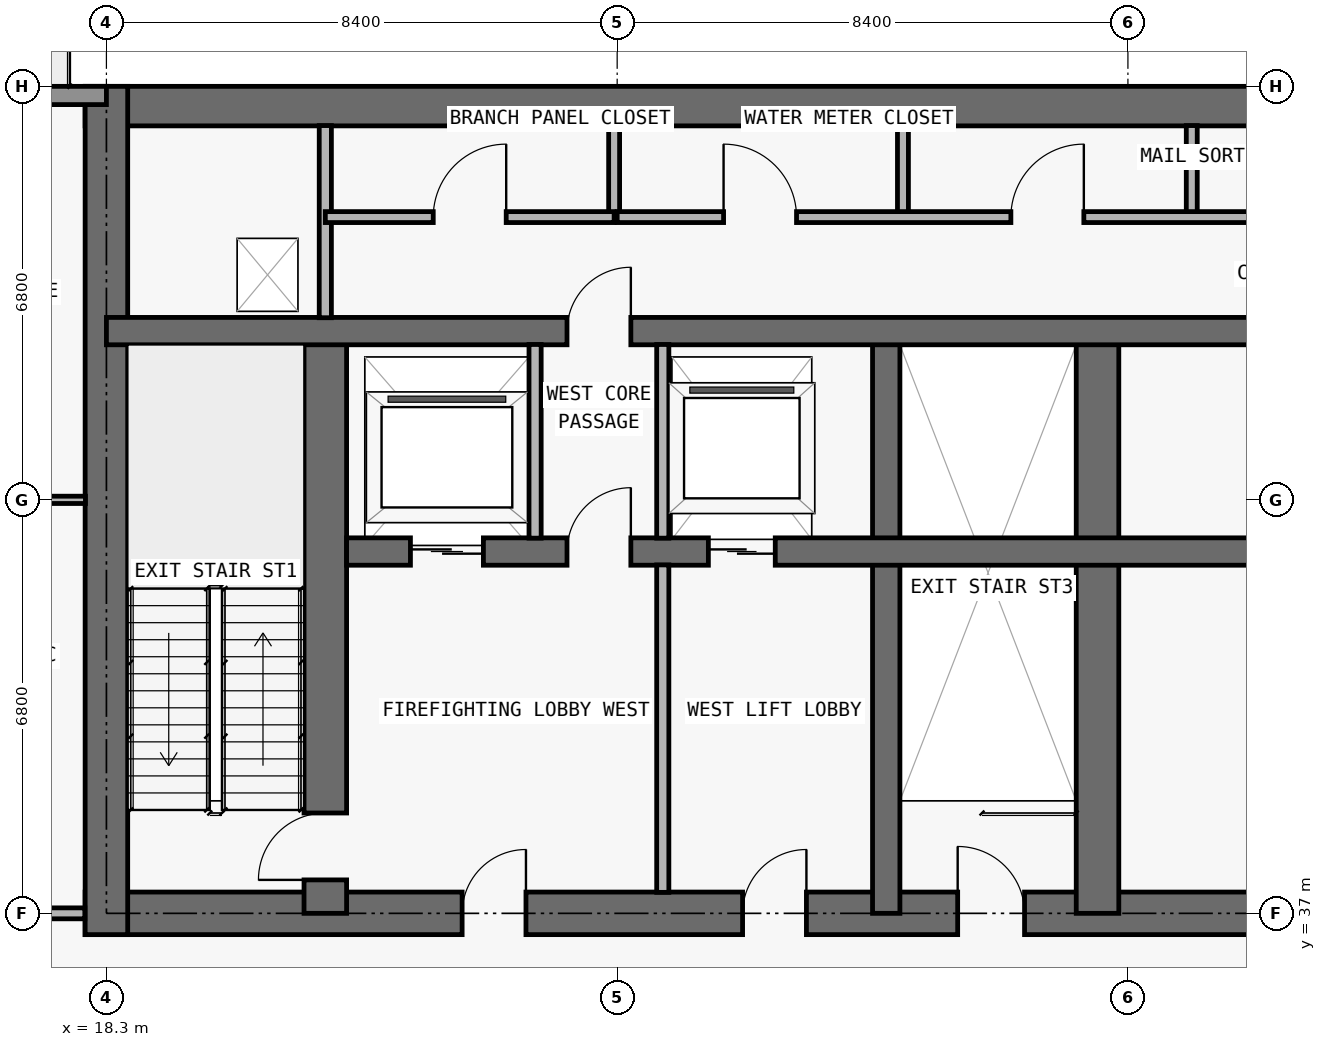
"""IFC4 building model, lengths in metres.
Left out: names, types, materials, properties, quantities, classifications, styles, units other than length and angle.
Written with IfcOpenShell. Run it as: python <this file> out.ifc"""

import sys

from ifc_helpers import new_model, si_unit, direction, frame, frame_2d, origin, place, context, subcontext, project, spatial, rectangle, extrude, element, fill, save


model = new_model("IFC4")
c1 = context("Model", 3, precision=1e-05, world=origin(), true_north=direction((0.0, 1.0)))
c2 = subcontext(c1, "Body", "Model", "MODEL_VIEW")
j1 = project(units=[si_unit("LENGTHUNIT", "METRE"), si_unit("PLANEANGLEUNIT", "RADIAN")], contexts=[c1])
p1 = place(None, origin())
s1 = spatial("IfcSite", under=j1, at=p1, CompositionType="ELEMENT")
p2 = place(p1, origin())
s2 = spatial("IfcBuilding", under=s1, at=p2, CompositionType="ELEMENT")
p3 = place(p2, frame((0.0, 0.0, 269.4)))
s3 = spatial("IfcBuildingStorey", under=s2, at=p3, CompositionType="ELEMENT", Elevation=269.4)
p4 = place(p3, frame((17.95, 37.0, 0.0), z_axis=(0.0, 0.0, 1.0), x_axis=(1.0, 0.0, 0.0)))
e1 = element("IfcWall", 1, at=p4, inside=s3, PredefinedType="SHEAR", context=c2, shape_type="SweptSolid", body=[
    extrude(rectangle(XDim=41.9, YDim=0.7, at=frame_2d((20.95, 0.0))), origin(), (0.0, 0.0, 1.0), 4.5),
])
p5 = place(p4, frame((14.35, 0.0, 0.0)))
e2 = element("IfcOpeningElement", 2, at=p5, cuts=e1, PredefinedType="OPENING", context=c2, shape_type="SweptSolid", body=[
    extrude(rectangle(XDim=1.1, YDim=2.15, at=frame_2d((0.55, 1.075))), frame((0.0, 0.36, 0.0), z_axis=(0.0, -1.0, 0.0), x_axis=(1.0, 0.0, 0.0)), (0.0, 0.0, 1.0), 0.72),
])
p6 = place(p4, frame((6.2, 0.0, 0.0)))
e3 = element("IfcOpeningElement", 3, at=p6, cuts=e1, PredefinedType="OPENING", context=c2, shape_type="SweptSolid", body=[
    extrude(rectangle(XDim=1.05, YDim=2.15, at=frame_2d((0.525, 1.075))), frame((0.0, 0.36, 0.0), z_axis=(0.0, -1.0, 0.0), x_axis=(1.0, 0.0, 0.0)), (0.0, 0.0, 1.0), 0.72),
])
p7 = place(p4, frame((34.7, 0.0, 0.0)))
e4 = element("IfcOpeningElement", 4, at=p7, cuts=e1, PredefinedType="OPENING", context=c2, shape_type="SweptSolid", body=[
    extrude(rectangle(XDim=1.05, YDim=2.15, at=frame_2d((0.525, 1.075))), frame((0.0, 0.36, 0.0), z_axis=(0.0, -1.0, 0.0), x_axis=(1.0, 0.0, 0.0)), (0.0, 0.0, 1.0), 0.72),
])
p8 = place(p4, frame((10.812, 0.0, 0.0)))
e5 = element("IfcOpeningElement", 5, at=p8, cuts=e1, PredefinedType="OPENING", context=c2, shape_type="SweptSolid", body=[
    extrude(rectangle(XDim=1.05, YDim=2.15, at=frame_2d((0.525, 1.075))), frame((0.0, 0.36, 0.0), z_axis=(0.0, -1.0, 0.0), x_axis=(1.0, 0.0, 0.0)), (0.0, 0.0, 1.0), 0.72),
])
p9 = place(p4, frame((24.05, 0.0, 0.0)))
e6 = element("IfcOpeningElement", 6, at=p9, cuts=e1, PredefinedType="OPENING", context=c2, shape_type="SweptSolid", body=[
    extrude(rectangle(XDim=1.05, YDim=2.15, at=frame_2d((0.525, 1.075))), frame((0.0, 0.36, 0.0), z_axis=(0.0, -1.0, 0.0), x_axis=(1.0, 0.0, 0.0)), (0.0, 0.0, 1.0), 0.72),
])
p10 = place(p3, frame((17.95, 50.275, 0.0), z_axis=(0.0, 0.0, 1.0), x_axis=(1.0, 0.0, 0.0)))
e7 = element("IfcWall", 7, at=p10, inside=s3, PredefinedType="SHEAR", context=c2, shape_type="SweptSolid", body=[
    extrude(rectangle(XDim=41.9, YDim=0.65, at=frame_2d((20.95, 0.0))), origin(), (0.0, 0.0, 1.0), 4.5),
])
p11 = place(p3, frame((18.3, 36.65, 0.0), z_axis=(0.0, 0.0, 1.0), x_axis=(0.0, 1.0, 0.0)))
e8 = element("IfcWall", 8, at=p11, inside=s3, PredefinedType="SHEAR", context=c2, shape_type="SweptSolid", body=[
    extrude(rectangle(XDim=13.95, YDim=0.7, at=frame_2d((6.975, 0.0))), origin(), (0.0, 0.0, 1.0), 4.5),
])
p12 = place(p3, frame((21.9, 37.0, 0.0), z_axis=(0.0, 0.0, 1.0), x_axis=(0.0, 1.0, 0.0)))
e9 = element("IfcWall", 9, at=p12, inside=s3, PredefinedType="SHEAR", context=c2, shape_type="SweptSolid", body=[
    extrude(rectangle(XDim=9.575, YDim=0.7, at=frame_2d((4.788, 0.0))), origin(), (0.0, 0.0, 1.0), 4.5),
])
p13 = place(p12, frame((0.55, 0.0, 0.0)))
e10 = element("IfcOpeningElement", 10, at=p13, cuts=e9, PredefinedType="OPENING", context=c2, shape_type="SweptSolid", body=[
    extrude(rectangle(XDim=1.1, YDim=2.15, at=frame_2d((0.55, 1.075))), frame((0.0, 0.36, 0.0), z_axis=(0.0, -1.0, 0.0), x_axis=(1.0, 0.0, 0.0)), (0.0, 0.0, 1.0), 0.72),
])
p14 = place(p3, frame((31.125, 37.0, 0.0), z_axis=(0.0, 0.0, 1.0), x_axis=(0.0, 1.0, 0.0)))
e11 = element("IfcWall", 11, at=p14, inside=s3, PredefinedType="SHEAR", context=c2, shape_type="SweptSolid", body=[
    extrude(rectangle(XDim=9.575, YDim=0.45, at=frame_2d((4.788, 0.0))), origin(), (0.0, 0.0, 1.0), 4.5),
])
p15 = place(p3, frame((34.6, 37.0, 0.0), z_axis=(0.0, 0.0, 1.0), x_axis=(0.0, 1.0, 0.0)))
e12 = element("IfcWall", 12, at=p15, inside=s3, PredefinedType="SHEAR", context=c2, shape_type="SweptSolid", body=[
    extrude(rectangle(XDim=9.575, YDim=0.7, at=frame_2d((4.788, 0.0))), origin(), (0.0, 0.0, 1.0), 4.5),
])
p16 = place(p3, frame((22.25, 42.95, 0.0), z_axis=(0.0, 0.0, 1.0), x_axis=(1.0, 0.0, 0.0)))
e13 = element("IfcWall", 13, at=p16, inside=s3, PredefinedType="SHEAR", context=c2, shape_type="SweptSolid", body=[
    extrude(rectangle(XDim=33.3, YDim=0.45, at=frame_2d((16.65, 0.0))), origin(), (0.0, 0.0, 1.0), 4.5),
])
p17 = place(p16, frame((1.05, 0.0, 0.0)))
e14 = element("IfcOpeningElement", 14, at=p17, cuts=e13, PredefinedType="OPENING", context=c2, shape_type="SweptSolid", body=[
    extrude(rectangle(XDim=1.2, YDim=2.2, at=frame_2d((0.6, 1.1))), frame((0.0, 0.235, 0.0), z_axis=(0.0, -1.0, 0.0), x_axis=(1.0, 0.0, 0.0)), (0.0, 0.0, 1.0), 0.47),
])
p18 = place(p16, frame((31.05, 0.0, 0.0)))
e15 = element("IfcOpeningElement", 15, at=p18, cuts=e13, PredefinedType="OPENING", context=c2, shape_type="SweptSolid", body=[
    extrude(rectangle(XDim=1.2, YDim=2.2, at=frame_2d((0.6, 1.1))), frame((0.0, 0.235, 0.0), z_axis=(0.0, -1.0, 0.0), x_axis=(1.0, 0.0, 0.0)), (0.0, 0.0, 1.0), 0.47),
])
p19 = place(p16, frame((26.45, 0.0, 0.0)))
e16 = element("IfcOpeningElement", 16, at=p19, cuts=e13, PredefinedType="OPENING", context=c2, shape_type="SweptSolid", body=[
    extrude(rectangle(XDim=1.1, YDim=2.2, at=frame_2d((0.55, 1.1))), frame((0.0, 0.235, 0.0), z_axis=(0.0, -1.0, 0.0), x_axis=(1.0, 0.0, 0.0)), (0.0, 0.0, 1.0), 0.47),
])
p20 = place(p16, frame((5.95, 0.0, 0.0)))
e17 = element("IfcOpeningElement", 17, at=p20, cuts=e13, PredefinedType="OPENING", context=c2, shape_type="SweptSolid", body=[
    extrude(rectangle(XDim=1.1, YDim=2.2, at=frame_2d((0.55, 1.1))), frame((0.0, 0.235, 0.0), z_axis=(0.0, -1.0, 0.0), x_axis=(1.0, 0.0, 0.0)), (0.0, 0.0, 1.0), 0.47),
])
p21 = place(p16, frame((3.625, 0.0, 0.0)))
e18 = element("IfcOpeningElement", 18, at=p21, cuts=e13, PredefinedType="OPENING", context=c2, shape_type="SweptSolid", body=[
    extrude(rectangle(XDim=1.05, YDim=2.15, at=frame_2d((0.525, 1.075))), frame((0.0, 0.235, 0.0), z_axis=(0.0, -1.0, 0.0), x_axis=(1.0, 0.0, 0.0)), (0.0, 0.0, 1.0), 0.47),
])
p22 = place(p16, frame((28.675, 0.0, 0.0)))
e19 = element("IfcOpeningElement", 19, at=p22, cuts=e13, PredefinedType="OPENING", context=c2, shape_type="SweptSolid", body=[
    extrude(rectangle(XDim=1.05, YDim=2.15, at=frame_2d((0.525, 1.075))), frame((0.0, 0.235, 0.0), z_axis=(0.0, -1.0, 0.0), x_axis=(1.0, 0.0, 0.0)), (0.0, 0.0, 1.0), 0.47),
])
p23 = place(p16, frame((15.225, 0.0, 0.0)))
e20 = element("IfcOpeningElement", 20, at=p23, cuts=e13, PredefinedType="OPENING", context=c2, shape_type="SweptSolid", body=[
    extrude(rectangle(XDim=1.0, YDim=2.2, at=frame_2d((0.5, 1.1))), frame((0.0, 0.235, 0.0), z_axis=(0.0, -1.0, 0.0), x_axis=(1.0, 0.0, 0.0)), (0.0, 0.0, 1.0), 0.47),
])
p24 = place(p16, frame((21.975, 0.0, 0.0)))
e21 = element("IfcOpeningElement", 21, at=p24, cuts=e13, PredefinedType="OPENING", context=c2, shape_type="SweptSolid", body=[
    extrude(rectangle(XDim=1.0, YDim=2.2, at=frame_2d((0.5, 1.1))), frame((0.0, 0.235, 0.0), z_axis=(0.0, -1.0, 0.0), x_axis=(1.0, 0.0, 0.0)), (0.0, 0.0, 1.0), 0.47),
])
p25 = place(p3, frame((18.3, 46.575, 0.0), z_axis=(0.0, 0.0, 1.0), x_axis=(1.0, 0.0, 0.0)))
e22 = element("IfcWall", 22, at=p25, inside=s3, PredefinedType="SHEAR", context=c2, shape_type="SweptSolid", body=[
    extrude(rectangle(XDim=41.2, YDim=0.45, at=frame_2d((20.6, 0.0))), origin(), (0.0, 0.0, 1.0), 4.5),
])
p26 = place(p25, frame((7.575, 0.0, 0.0)))
e23 = element("IfcOpeningElement", 23, at=p26, cuts=e22, PredefinedType="OPENING", context=c2, shape_type="SweptSolid", body=[
    extrude(rectangle(XDim=1.05, YDim=2.15, at=frame_2d((0.525, 1.075))), frame((0.0, 0.235, 0.0), z_axis=(0.0, -1.0, 0.0), x_axis=(1.0, 0.0, 0.0)), (0.0, 0.0, 1.0), 0.47),
])
p27 = place(p25, frame((32.625, 0.0, 0.0)))
e24 = element("IfcOpeningElement", 24, at=p27, cuts=e22, PredefinedType="OPENING", context=c2, shape_type="SweptSolid", body=[
    extrude(rectangle(XDim=1.05, YDim=2.15, at=frame_2d((0.525, 1.075))), frame((0.0, 0.235, 0.0), z_axis=(0.0, -1.0, 0.0), x_axis=(1.0, 0.0, 0.0)), (0.0, 0.0, 1.0), 0.47),
])
p28 = place(p3, frame((12.1, 50.45, 0.0), z_axis=(0.0, 0.0, 1.0), x_axis=(1.0, 0.0, 0.0)))
e25 = element("IfcWall", 25, at=p28, inside=s3, PredefinedType="STANDARD", context=c2, shape_type="SweptSolid", body=[
    extrude(rectangle(XDim=6.2, YDim=0.3, at=frame_2d((3.1, 0.0))), origin(), (0.0, 0.0, 1.0), 4.5),
])
p29 = place(p28, frame((2.1, 0.0, 0.0)))
e26 = element("IfcOpeningElement", 26, at=p29, cuts=e25, PredefinedType="OPENING", context=c2, shape_type="SweptSolid", body=[
    extrude(rectangle(XDim=2.0, YDim=2.3, at=frame_2d((1.0, 1.15))), frame((0.0, 0.16, 0.0), z_axis=(0.0, -1.0, 0.0), x_axis=(1.0, 0.0, 0.0)), (0.0, 0.0, 1.0), 0.32),
])
p30 = place(p3, frame((21.9, 46.795, 0.0), z_axis=(0.0, 0.0, 1.0), x_axis=(0.0, 1.0, 0.0)))
e27 = element("IfcWall", 27, at=p30, inside=s3, PredefinedType="PARTITIONING", context=c2, shape_type="SweptSolid", body=[
    extrude(rectangle(XDim=3.16, YDim=0.2, at=frame_2d((1.58, 0.0))), origin(), (0.0, 0.0, 1.0), 4.5),
])
p31 = place(p3, frame((25.35, 43.17, 0.0), z_axis=(0.0, 0.0, 1.0), x_axis=(0.0, 1.0, 0.0)))
e28 = element("IfcWall", 28, at=p31, inside=s3, PredefinedType="PARTITIONING", context=c2, shape_type="SweptSolid", body=[
    extrude(rectangle(XDim=3.185, YDim=0.2, at=frame_2d((1.593, 0.0))), origin(), (0.0, 0.0, 1.0), 4.5),
])
p32 = place(p3, frame((26.65, 48.45, 0.0), z_axis=(0.0, 0.0, 1.0), x_axis=(0.0, 1.0, 0.0)))
e29 = element("IfcWall", 29, at=p32, inside=s3, PredefinedType="PARTITIONING", context=c2, shape_type="SweptSolid", body=[
    extrude(rectangle(XDim=1.505, YDim=0.18, at=frame_2d((0.752, 0.0))), origin(), (0.0, 0.0, 1.0), 4.5),
])
p33 = place(p3, frame((27.45, 37.345, 0.0), z_axis=(0.0, 0.0, 1.0), x_axis=(0.0, 1.0, 0.0)))
e30 = element("IfcWall", 30, at=p33, inside=s3, PredefinedType="PARTITIONING", context=c2, shape_type="SweptSolid", body=[
    extrude(rectangle(XDim=5.385, YDim=0.2, at=frame_2d((2.692, 0.0))), origin(), (0.0, 0.0, 1.0), 4.5),
])
p34 = place(p3, frame((27.45, 43.17, 0.0), z_axis=(0.0, 0.0, 1.0), x_axis=(0.0, 1.0, 0.0)))
e31 = element("IfcWall", 31, at=p34, inside=s3, PredefinedType="PARTITIONING", context=c2, shape_type="SweptSolid", body=[
    extrude(rectangle(XDim=3.185, YDim=0.2, at=frame_2d((1.593, 0.0))), origin(), (0.0, 0.0, 1.0), 4.5),
])
for number, where, z_axis, x_axis in (
    (32, (31.4, 48.45, 0.0), (0.0, 0.0, 1.0), (0.0, 1.0, 0.0)),
    (33, (36.15, 48.45, 0.0), (0.0, 0.0, 1.0), (0.0, 1.0, 0.0)),
):
    element("IfcWall", number, at=place(p3, frame(where, z_axis=z_axis, x_axis=x_axis)), inside=s3, PredefinedType="PARTITIONING", context=c2, shape_type="SweptSolid", body=[
        extrude(rectangle(XDim=1.505, YDim=0.18, at=frame_2d((0.752, 0.0))), origin(), (0.0, 0.0, 1.0), 4.5),
    ])
p35 = place(p3, frame((12.1, 37.0, 0.0), z_axis=(0.0, 0.0, 1.0), x_axis=(1.0, 0.0, 0.0)))
e34 = element("IfcWall", 34, at=p35, inside=s3, PredefinedType="PARTITIONING", context=c2, shape_type="SweptSolid", body=[
    extrude(rectangle(XDim=5.845, YDim=0.18, at=frame_2d((2.922, 0.0))), origin(), (0.0, 0.0, 1.0), 4.5),
])
p36 = place(p35, frame((0.625, 0.0, 0.0)))
e35 = element("IfcOpeningElement", 35, at=p36, cuts=e34, PredefinedType="OPENING", context=c2, shape_type="SweptSolid", body=[
    extrude(rectangle(XDim=0.85, YDim=2.1, at=frame_2d((0.425, 1.05))), frame((0.0, 0.1, 0.0), z_axis=(0.0, -1.0, 0.0), x_axis=(1.0, 0.0, 0.0)), (0.0, 0.0, 1.0), 0.2),
])
p37 = place(p35, frame((3.548, 0.0, 0.0)))
e36 = element("IfcOpeningElement", 36, at=p37, cuts=e34, PredefinedType="OPENING", context=c2, shape_type="SweptSolid", body=[
    extrude(rectangle(XDim=0.85, YDim=2.1, at=frame_2d((0.425, 1.05))), frame((0.0, 0.1, 0.0), z_axis=(0.0, -1.0, 0.0), x_axis=(1.0, 0.0, 0.0)), (0.0, 0.0, 1.0), 0.2),
])
p38 = place(p3, frame((12.1, 43.8, 0.0), z_axis=(0.0, 0.0, 1.0), x_axis=(1.0, 0.0, 0.0)))
e37 = element("IfcWall", 37, at=p38, inside=s3, PredefinedType="PARTITIONING", context=c2, shape_type="SweptSolid", body=[
    extrude(rectangle(XDim=5.855, YDim=0.12, at=frame_2d((2.927, 0.0))), origin(), (0.0, 0.0, 1.0), 4.5),
])
p39 = place(p38, frame((0.6, 0.0, 0.0)))
e38 = element("IfcOpeningElement", 38, at=p39, cuts=e37, PredefinedType="OPENING", context=c2, shape_type="SweptSolid", body=[
    extrude(rectangle(XDim=0.9, YDim=2.15, at=frame_2d((0.45, 1.075))), frame((0.0, 0.07, 0.0), z_axis=(0.0, -1.0, 0.0), x_axis=(1.0, 0.0, 0.0)), (0.0, 0.0, 1.0), 0.14),
])
p40 = place(p3, frame((21.9, 48.45, 0.0), z_axis=(0.0, 0.0, 1.0), x_axis=(1.0, 0.0, 0.0)))
e39 = element("IfcWall", 39, at=p40, inside=s3, PredefinedType="PARTITIONING", context=c2, shape_type="SweptSolid", body=[
    extrude(rectangle(XDim=4.75, YDim=0.18, at=frame_2d((2.375, 0.0))), origin(), (0.0, 0.0, 1.0), 4.5),
])
p41 = place(p40, frame((1.775, 0.0, 0.0)))
e40 = element("IfcOpeningElement", 40, at=p41, cuts=e39, PredefinedType="OPENING", context=c2, shape_type="SweptSolid", body=[
    extrude(rectangle(XDim=1.2, YDim=2.2, at=frame_2d((0.6, 1.1))), frame((0.0, 0.1, 0.0), z_axis=(0.0, -1.0, 0.0), x_axis=(1.0, 0.0, 0.0)), (0.0, 0.0, 1.0), 0.2),
])
p42 = place(p3, frame((26.7, 48.45, 0.0), z_axis=(0.0, 0.0, 1.0), x_axis=(1.0, 0.0, 0.0)))
e41 = element("IfcWall", 41, at=p42, inside=s3, PredefinedType="PARTITIONING", context=c2, shape_type="SweptSolid", body=[
    extrude(rectangle(XDim=29.2, YDim=0.18, at=frame_2d((14.6, 0.0))), origin(), (0.0, 0.0, 1.0), 4.5),
])
p43 = place(p42, frame((1.75, 0.0, 0.0)))
e42 = element("IfcOpeningElement", 42, at=p43, cuts=e41, PredefinedType="OPENING", context=c2, shape_type="SweptSolid", body=[
    extrude(rectangle(XDim=1.2, YDim=2.2, at=frame_2d((0.6, 1.1))), frame((0.0, 0.1, 0.0), z_axis=(0.0, -1.0, 0.0), x_axis=(1.0, 0.0, 0.0)), (0.0, 0.0, 1.0), 0.2),
])
p44 = place(p42, frame((6.475, 0.0, 0.0)))
e43 = element("IfcOpeningElement", 43, at=p44, cuts=e41, PredefinedType="OPENING", context=c2, shape_type="SweptSolid", body=[
    extrude(rectangle(XDim=1.2, YDim=2.2, at=frame_2d((0.6, 1.1))), frame((0.0, 0.1, 0.0), z_axis=(0.0, -1.0, 0.0), x_axis=(1.0, 0.0, 0.0)), (0.0, 0.0, 1.0), 0.2),
])
p45 = place(p42, frame((14.05, 0.0, 0.0)))
e44 = element("IfcOpeningElement", 44, at=p45, cuts=e41, PredefinedType="OPENING", context=c2, shape_type="SweptSolid", body=[
    extrude(rectangle(XDim=1.0, YDim=2.2, at=frame_2d((0.5, 1.1))), frame((0.0, 0.1, 0.0), z_axis=(0.0, -1.0, 0.0), x_axis=(1.0, 0.0, 0.0)), (0.0, 0.0, 1.0), 0.2),
])
p46 = place(p42, frame((21.425, 0.0, 0.0)))
e45 = element("IfcOpeningElement", 45, at=p46, cuts=e41, PredefinedType="OPENING", context=c2, shape_type="SweptSolid", body=[
    extrude(rectangle(XDim=1.2, YDim=2.2, at=frame_2d((0.6, 1.1))), frame((0.0, 0.1, 0.0), z_axis=(0.0, -1.0, 0.0), x_axis=(1.0, 0.0, 0.0)), (0.0, 0.0, 1.0), 0.2),
])
p47 = place(p42, frame((26.375, 0.0, 0.0)))
e46 = element("IfcOpeningElement", 46, at=p47, cuts=e41, PredefinedType="OPENING", context=c2, shape_type="SweptSolid", body=[
    extrude(rectangle(XDim=0.85, YDim=2.1, at=frame_2d((0.425, 1.05))), frame((0.0, 0.1, 0.0), z_axis=(0.0, -1.0, 0.0), x_axis=(1.0, 0.0, 0.0)), (0.0, 0.0, 1.0), 0.2),
])
p48 = place(p17, origin())
e47 = element("IfcDoor", 47, at=p48, inside=s3, OperationType="DOUBLE_DOOR_SLIDING", PredefinedType="DOOR", context=c2, shape_type="SweptSolid", body=[
    extrude(rectangle(XDim=1.2, YDim=2.2, at=frame_2d((0.6, 1.1))), frame((0.0, 0.025, 0.0), z_axis=(0.0, -1.0, 0.0), x_axis=(1.0, 0.0, 0.0)), (0.0, 0.0, 1.0), 0.05),
])
fill(e14, e47)
p49 = place(p20, origin())
e48 = element("IfcDoor", 48, at=p49, inside=s3, OperationType="DOUBLE_DOOR_SLIDING", PredefinedType="DOOR", context=c2, shape_type="SweptSolid", body=[
    extrude(rectangle(XDim=1.1, YDim=2.2, at=frame_2d((0.55, 1.1))), frame((0.0, 0.025, 0.0), z_axis=(0.0, -1.0, 0.0), x_axis=(1.0, 0.0, 0.0)), (0.0, 0.0, 1.0), 0.05),
])
fill(e17, e48)
p50 = place(p5, origin())
e49 = element("IfcDoor", 49, at=p50, inside=s3, OperationType="SINGLE_SWING_LEFT", PredefinedType="DOOR", context=c2, shape_type="SweptSolid", body=[
    extrude(rectangle(XDim=1.1, YDim=2.15, at=frame_2d((0.55, 1.075))), frame((0.0, 0.025, 0.0), z_axis=(0.0, -1.0, 0.0), x_axis=(1.0, 0.0, 0.0)), (0.0, 0.0, 1.0), 0.05),
])
fill(e2, e49)
p51 = place(p6, origin())
e50 = element("IfcDoor", 50, at=p51, inside=s3, OperationType="SINGLE_SWING_RIGHT", PredefinedType="DOOR", context=c2, shape_type="SweptSolid", body=[
    extrude(rectangle(XDim=1.05, YDim=2.15, at=frame_2d((0.525, 1.075))), frame((0.0, 0.025, 0.0), z_axis=(0.0, -1.0, 0.0), x_axis=(1.0, 0.0, 0.0)), (0.0, 0.0, 1.0), 0.05),
])
fill(e3, e50)
p52 = place(p13, origin())
e51 = element("IfcDoor", 51, at=p52, inside=s3, OperationType="SINGLE_SWING_LEFT", PredefinedType="DOOR", context=c2, shape_type="SweptSolid", body=[
    extrude(rectangle(XDim=1.1, YDim=2.15, at=frame_2d((0.55, 1.075))), frame((0.0, 0.025, 0.0), z_axis=(0.0, -1.0, 0.0), x_axis=(1.0, 0.0, 0.0)), (0.0, 0.0, 1.0), 0.05),
])
fill(e10, e51)
p53 = place(p21, origin())
e52 = element("IfcDoor", 52, at=p53, inside=s3, OperationType="SINGLE_SWING_RIGHT", PredefinedType="DOOR", context=c2, shape_type="SweptSolid", body=[
    extrude(rectangle(XDim=1.05, YDim=2.15, at=frame_2d((0.525, 1.075))), frame((0.0, 0.025, 0.0), z_axis=(0.0, -1.0, 0.0), x_axis=(1.0, 0.0, 0.0)), (0.0, 0.0, 1.0), 0.05),
])
fill(e18, e52)
p54 = place(p8, origin())
e53 = element("IfcDoor", 53, at=p54, inside=s3, OperationType="SINGLE_SWING_RIGHT", PredefinedType="DOOR", context=c2, shape_type="SweptSolid", body=[
    extrude(rectangle(XDim=1.05, YDim=2.15, at=frame_2d((0.525, 1.075))), frame((0.0, 0.025, 0.0), z_axis=(0.0, -1.0, 0.0), x_axis=(1.0, 0.0, 0.0)), (0.0, 0.0, 1.0), 0.05),
])
fill(e5, e53)
p55 = place(p26, origin())
e54 = element("IfcDoor", 54, at=p55, inside=s3, OperationType="SINGLE_SWING_RIGHT", PredefinedType="DOOR", context=c2, shape_type="SweptSolid", body=[
    extrude(rectangle(XDim=1.05, YDim=2.15, at=frame_2d((0.525, 1.075))), frame((0.0, 0.025, 0.0), z_axis=(0.0, -1.0, 0.0), x_axis=(1.0, 0.0, 0.0)), (0.0, 0.0, 1.0), 0.05),
])
fill(e23, e54)
p56 = place(p41, origin())
e55 = element("IfcDoor", 55, at=p56, inside=s3, OperationType="SINGLE_SWING_RIGHT", PredefinedType="DOOR", context=c2, shape_type="SweptSolid", body=[
    extrude(rectangle(XDim=1.2, YDim=2.2, at=frame_2d((0.6, 1.1))), frame((0.0, 0.025, 0.0), z_axis=(0.0, -1.0, 0.0), x_axis=(1.0, 0.0, 0.0)), (0.0, 0.0, 1.0), 0.05),
])
fill(e40, e55)
p57 = place(p43, origin())
e56 = element("IfcDoor", 56, at=p57, inside=s3, OperationType="SINGLE_SWING_LEFT", PredefinedType="DOOR", context=c2, shape_type="SweptSolid", body=[
    extrude(rectangle(XDim=1.2, YDim=2.2, at=frame_2d((0.6, 1.1))), frame((0.0, 0.025, 0.0), z_axis=(0.0, -1.0, 0.0), x_axis=(1.0, 0.0, 0.0)), (0.0, 0.0, 1.0), 0.05),
])
fill(e42, e56)
p58 = place(p44, origin())
e57 = element("IfcDoor", 57, at=p58, inside=s3, OperationType="SINGLE_SWING_RIGHT", PredefinedType="DOOR", context=c2, shape_type="SweptSolid", body=[
    extrude(rectangle(XDim=1.2, YDim=2.2, at=frame_2d((0.6, 1.1))), frame((0.0, 0.025, 0.0), z_axis=(0.0, -1.0, 0.0), x_axis=(1.0, 0.0, 0.0)), (0.0, 0.0, 1.0), 0.05),
])
fill(e43, e57)
save(model, sys.argv[1])
